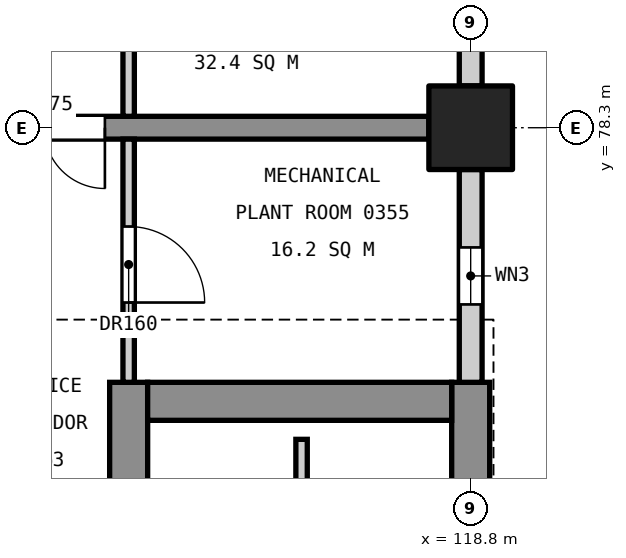
"""IFC4 building model, lengths in metres.
Left out: names, types, materials, properties, quantities, classifications, styles, units other than length and angle.
Written with IfcOpenShell. Run it as: python <this file> out.ifc"""

import sys

from ifc_helpers import new_model, si_unit, direction, frame, frame_2d, origin, origin_2d, place, context, subcontext, project, spatial, rectangle, extrude, element, fill, save


model = new_model("IFC4")
c1 = context("Model", 3, precision=1e-05, world=origin(), true_north=direction((0.0, 1.0)))
c2 = subcontext(c1, "Body", "Model", "MODEL_VIEW")
j1 = project(units=[si_unit("LENGTHUNIT", "METRE"), si_unit("PLANEANGLEUNIT", "RADIAN")], contexts=[c1])
p1 = place(None, origin())
s1 = spatial("IfcSite", under=j1, at=p1, CompositionType="ELEMENT")
p2 = place(p1, origin())
s2 = spatial("IfcBuilding", under=s1, at=p2, CompositionType="ELEMENT")
p3 = place(p2, frame((0.0, 0.0, 16.8)))
s3 = spatial("IfcBuildingStorey", under=s2, at=p3, CompositionType="ELEMENT", Elevation=16.8)
p4 = place(p3, frame((118.8, 78.3, 0.0), z_axis=(0.0, 0.0, 1.0), x_axis=(1.0, 0.0, 0.0)))
e1 = element("IfcColumn", 1, at=p4, inside=s3, PredefinedType="COLUMN", context=c2, shape_type="SweptSolid", body=[
    extrude(rectangle(XDim=1.1, YDim=1.1, at=origin_2d()), origin(), (0.0, 0.0, 1.0), 5.4),
])
p5 = place(p3, frame((118.8, 60.05, 0.0), z_axis=(0.0, 0.0, 1.0), x_axis=(0.0, 1.0, 0.0)))
e2 = element("IfcWall", 2, at=p5, inside=s3, PredefinedType="SHEAR", context=c2, shape_type="SweptSolid", body=[
    extrude(rectangle(XDim=14.9, YDim=0.5, at=frame_2d((7.45, 0.0))), origin(), (0.0, 0.0, 1.0), 5.15),
])
p6 = place(p5, frame((6.3, 0.0, 3.4)))
e3 = element("IfcOpeningElement", 3, at=p6, cuts=e2, PredefinedType="OPENING", context=c2, shape_type="SweptSolid", body=[
    extrude(rectangle(XDim=1.2, YDim=0.9, at=frame_2d((0.6, 0.45))), frame((0.0, 0.26, 0.0), z_axis=(0.0, -1.0, 0.0), x_axis=(1.0, 0.0, 0.0)), (0.0, 0.0, 1.0), 0.52),
])
p7 = place(p3, frame((114.3, 60.05, 0.0), z_axis=(0.0, 0.0, 1.0), x_axis=(0.0, 1.0, 0.0)))
e4 = element("IfcWall", 4, at=p7, inside=s3, PredefinedType="SHEAR", context=c2, shape_type="SweptSolid", body=[
    extrude(rectangle(XDim=14.9, YDim=0.5, at=frame_2d((7.45, 0.0))), origin(), (0.0, 0.0, 1.0), 5.15),
])
p8 = place(p7, frame((0.55, 0.0, 0.0)))
e5 = element("IfcOpeningElement", 5, at=p8, cuts=e4, PredefinedType="OPENING", context=c2, shape_type="SweptSolid", body=[
    extrude(rectangle(XDim=1.4, YDim=2.1, at=frame_2d((0.7, 1.05))), frame((0.0, 0.26, 0.0), z_axis=(0.0, -1.0, 0.0), x_axis=(1.0, 0.0, 0.0)), (0.0, 0.0, 1.0), 0.52),
])
p9 = place(p7, frame((8.85, 0.0, 0.0)))
e6 = element("IfcOpeningElement", 6, at=p9, cuts=e4, PredefinedType="OPENING", context=c2, shape_type="SweptSolid", body=[
    extrude(rectangle(XDim=1.1, YDim=2.1, at=frame_2d((0.55, 1.05))), frame((0.0, 0.26, 0.0), z_axis=(0.0, -1.0, 0.0), x_axis=(1.0, 0.0, 0.0)), (0.0, 0.0, 1.0), 0.52),
])
p10 = place(p7, frame((11.4, 0.0, 0.0)))
e7 = element("IfcOpeningElement", 7, at=p10, cuts=e4, PredefinedType="OPENING", context=c2, shape_type="SweptSolid", body=[
    extrude(rectangle(XDim=1.1, YDim=2.1, at=frame_2d((0.55, 1.05))), frame((0.0, 0.26, 0.0), z_axis=(0.0, -1.0, 0.0), x_axis=(1.0, 0.0, 0.0)), (0.0, 0.0, 1.0), 0.52),
])
p11 = place(p3, frame((118.55, 74.7, 0.0), z_axis=(0.0, 0.0, 1.0), x_axis=(-1.0, 0.0, 0.0)))
e8 = element("IfcWall", 8, at=p11, inside=s3, PredefinedType="SHEAR", context=c2, shape_type="SweptSolid", body=[
    extrude(rectangle(XDim=4.0, YDim=0.5, at=frame_2d((2.0, 0.0))), origin(), (0.0, 0.0, 1.0), 5.15),
])
p12 = place(p3, frame((118.25, 78.3, 0.0), z_axis=(0.0, 0.0, 1.0), x_axis=(-1.0, 0.0, 0.0)))
e9 = element("IfcWall", 9, at=p12, inside=s3, PredefinedType="SHEAR", context=c2, shape_type="SweptSolid", body=[
    extrude(rectangle(XDim=6.1, YDim=0.3, at=frame_2d((3.05, 0.0))), origin(), (0.0, 0.0, 1.0), 5.15),
])
p13 = place(p12, frame((4.262, 0.0, 0.0)))
e10 = element("IfcOpeningElement", 10, at=p13, cuts=e9, PredefinedType="OPENING", context=c2, shape_type="SweptSolid", body=[
    extrude(rectangle(XDim=1.6, YDim=2.1, at=frame_2d((0.8, 1.05))), frame((0.0, 0.16, 0.0), z_axis=(0.0, -1.0, 0.0), x_axis=(1.0, 0.0, 0.0)), (0.0, 0.0, 1.0), 0.32),
])
p14 = place(p3, frame((116.575, 73.3, 0.0), z_axis=(0.0, 0.0, 1.0), x_axis=(0.0, 1.0, 0.0)))
e11 = element("IfcWall", 11, at=p14, inside=s3, PredefinedType="SOLIDWALL", context=c2, shape_type="SweptSolid", body=[
    extrude(rectangle(XDim=0.9, YDim=0.15, at=frame_2d((0.45, 0.0))), origin(), (0.0, 0.0, 1.0), 5.4),
])
p15 = place(p3, frame((118.8, 74.95, 0.0), z_axis=(0.0, 0.0, 1.0), x_axis=(0.0, 1.0, 0.0)))
e12 = element("IfcWall", 12, at=p15, inside=s3, PredefinedType="STANDARD", context=c2, shape_type="SweptSolid", body=[
    extrude(rectangle(XDim=2.8, YDim=0.3, at=frame_2d((1.4, 0.0))), origin(), (0.0, 0.0, 1.0), 4.25),
])
p16 = place(p15, frame((1.025, 0.0, 0.8)))
e13 = element("IfcOpeningElement", 13, at=p16, cuts=e12, PredefinedType="OPENING", context=c2, shape_type="SweptSolid", body=[
    extrude(rectangle(XDim=0.75, YDim=1.2, at=frame_2d((0.375, 0.6))), frame((0.0, 0.16, 0.0), z_axis=(0.0, -1.0, 0.0), x_axis=(1.0, 0.0, 0.0)), (0.0, 0.0, 1.0), 0.32),
])
p17 = place(p3, frame((118.8, 78.85, 0.0), z_axis=(0.0, 0.0, 1.0), x_axis=(0.0, 1.0, 0.0)))
e14 = element("IfcWall", 14, at=p17, inside=s3, PredefinedType="STANDARD", context=c2, shape_type="SweptSolid", body=[
    extrude(rectangle(XDim=10.0, YDim=0.3, at=frame_2d((5.0, 0.0))), origin(), (0.0, 0.0, 1.0), 4.25),
])
p18 = place(p17, frame((0.625, 0.0, 0.9)))
e15 = element("IfcOpeningElement", 15, at=p18, cuts=e14, PredefinedType="OPENING", context=c2, shape_type="SweptSolid", body=[
    extrude(rectangle(XDim=1.8, YDim=3.0, at=frame_2d((0.9, 1.5))), frame((0.0, 0.16, 0.0), z_axis=(0.0, -1.0, 0.0), x_axis=(1.0, 0.0, 0.0)), (0.0, 0.0, 1.0), 0.32),
])
p19 = place(p17, frame((3.95, 0.0, 0.9)))
e16 = element("IfcOpeningElement", 16, at=p19, cuts=e14, PredefinedType="OPENING", context=c2, shape_type="SweptSolid", body=[
    extrude(rectangle(XDim=1.8, YDim=3.0, at=frame_2d((0.9, 1.5))), frame((0.0, 0.16, 0.0), z_axis=(0.0, -1.0, 0.0), x_axis=(1.0, 0.0, 0.0)), (0.0, 0.0, 1.0), 0.32),
])
p20 = place(p17, frame((7.95, 0.0, 0.8)))
e17 = element("IfcOpeningElement", 17, at=p20, cuts=e14, PredefinedType="OPENING", context=c2, shape_type="SweptSolid", body=[
    extrude(rectangle(XDim=0.75, YDim=1.2, at=frame_2d((0.375, 0.6))), frame((0.0, 0.16, 0.0), z_axis=(0.0, -1.0, 0.0), x_axis=(1.0, 0.0, 0.0)), (0.0, 0.0, 1.0), 0.32),
])
p21 = place(p3, frame((114.3, 74.95, 0.0), z_axis=(0.0, 0.0, 1.0), x_axis=(0.0, 1.0, 0.0)))
e18 = element("IfcWall", 18, at=p21, inside=s3, PredefinedType="PARTITIONING", context=c2, shape_type="SweptSolid", body=[
    extrude(rectangle(XDim=3.2, YDim=0.15, at=frame_2d((1.6, 0.0))), origin(), (0.0, 0.0, 1.0), 4.05),
])
p22 = place(p21, frame((1.05, 0.0, 0.0)))
e19 = element("IfcOpeningElement", 19, at=p22, cuts=e18, PredefinedType="OPENING", context=c2, shape_type="SweptSolid", body=[
    extrude(rectangle(XDim=1.0, YDim=2.1, at=frame_2d((0.5, 1.05))), frame((0.0, 0.085, 0.0), z_axis=(0.0, -1.0, 0.0), x_axis=(1.0, 0.0, 0.0)), (0.0, 0.0, 1.0), 0.17),
])
p23 = place(p3, frame((114.3, 78.45, 0.0), z_axis=(0.0, 0.0, 1.0), x_axis=(0.0, 1.0, 0.0)))
e20 = element("IfcWall", 20, at=p23, inside=s3, PredefinedType="PARTITIONING", context=c2, shape_type="SweptSolid", body=[
    extrude(rectangle(XDim=10.4, YDim=0.15, at=frame_2d((5.2, 0.0))), origin(), (0.0, 0.0, 1.0), 4.05),
])
p24 = place(p23, frame((8.35, 0.0, 0.0)))
e21 = element("IfcOpeningElement", 21, at=p24, cuts=e20, PredefinedType="OPENING", context=c2, shape_type="SweptSolid", body=[
    extrude(rectangle(XDim=1.0, YDim=2.1, at=frame_2d((0.5, 1.05))), frame((0.0, 0.085, 0.0), z_axis=(0.0, -1.0, 0.0), x_axis=(1.0, 0.0, 0.0)), (0.0, 0.0, 1.0), 0.17),
])
p25 = place(p23, frame((2.95, 0.0, 0.0)))
e22 = element("IfcOpeningElement", 22, at=p25, cuts=e20, PredefinedType="OPENING", context=c2, shape_type="SweptSolid", body=[
    extrude(rectangle(XDim=1.0, YDim=2.1, at=frame_2d((0.5, 1.05))), frame((0.0, 0.085, 0.0), z_axis=(0.0, -1.0, 0.0), x_axis=(1.0, 0.0, 0.0)), (0.0, 0.0, 1.0), 0.17),
])
p26 = place(p16, origin())
e23 = element("IfcWindow", 23, at=p26, inside=s3, PartitioningType="SINGLE_PANEL", PredefinedType="WINDOW", context=c2, shape_type="SweptSolid", body=[
    extrude(rectangle(XDim=0.75, YDim=1.2, at=frame_2d((0.375, 0.6))), frame((0.0, 0.03, 0.0), z_axis=(0.0, -1.0, 0.0), x_axis=(1.0, 0.0, 0.0)), (0.0, 0.0, 1.0), 0.06),
])
fill(e13, e23)
p27 = place(p22, frame((1.0, 0.0, 0.0), z_axis=(0.0, 0.0, 1.0), x_axis=(-1.0, 0.0, 0.0)))
e24 = element("IfcDoor", 24, at=p27, inside=s3, OperationType="SINGLE_SWING_RIGHT", PredefinedType="DOOR", context=c2, shape_type="SweptSolid", body=[
    extrude(rectangle(XDim=1.0, YDim=2.1, at=frame_2d((0.5, 1.05))), frame((0.0, 0.025, 0.0), z_axis=(0.0, -1.0, 0.0), x_axis=(1.0, 0.0, 0.0)), (0.0, 0.0, 1.0), 0.05),
])
fill(e19, e24)
p28 = place(p13, origin())
e25 = element("IfcDoor", 25, at=p28, inside=s3, OperationType="DOUBLE_DOOR_SINGLE_SWING", PredefinedType="DOOR", context=c2, shape_type="SweptSolid", body=[
    extrude(rectangle(XDim=1.6, YDim=2.1, at=frame_2d((0.8, 1.05))), frame((0.0, 0.025, 0.0), z_axis=(0.0, -1.0, 0.0), x_axis=(1.0, 0.0, 0.0)), (0.0, 0.0, 1.0), 0.05),
])
fill(e10, e25)
save(model, sys.argv[1])
